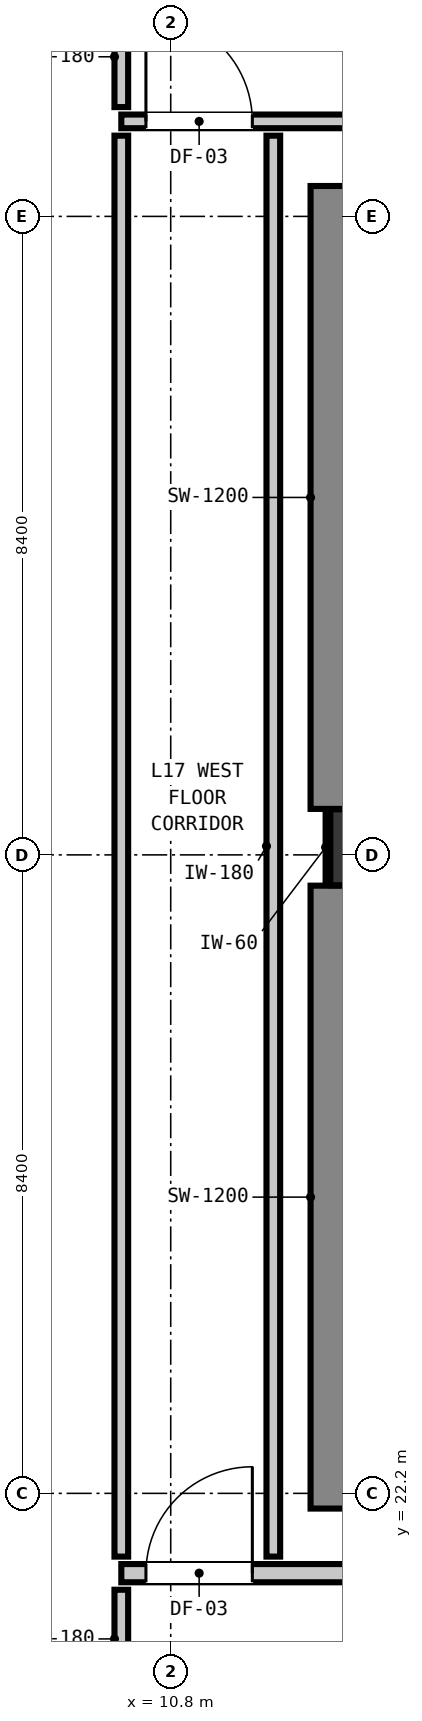
"""IFC4 building model, lengths in metres.
Left out: names, types, materials, properties, quantities, classifications, styles, units other than length and angle.
Written with IfcOpenShell. Run it as: python <this file> out.ifc"""

import sys

from ifc_helpers import new_model, si_unit, direction, frame, frame_2d, origin, origin_2d, place, context, subcontext, project, spatial, rectangle, extrude, element, fill, save


model = new_model("IFC4")
c1 = context("Model", 3, precision=1e-05, world=origin(), true_north=direction((0.0, 1.0)))
c2 = subcontext(c1, "Body", "Model", "MODEL_VIEW")
j1 = project(units=[si_unit("LENGTHUNIT", "METRE"), si_unit("PLANEANGLEUNIT", "RADIAN")], contexts=[c1])
p1 = place(None, origin())
s1 = spatial("IfcSite", under=j1, at=p1, CompositionType="ELEMENT")
p2 = place(p1, origin())
s2 = spatial("IfcBuilding", under=s1, at=p2, CompositionType="ELEMENT")
p3 = place(p2, frame((0.0, 0.0, 61.84)))
s3 = spatial("IfcBuildingStorey", under=s2, at=p3, CompositionType="ELEMENT", Elevation=61.84)
p4 = place(p3, frame((13.4, 30.7, 0.0), z_axis=(0.0, 0.0, 1.0), x_axis=(1.0, 0.0, 0.0)))
e1 = element("IfcColumn", 1, at=p4, inside=s3, PredefinedType="COLUMN", context=c2, shape_type="SweptSolid", body=[
    extrude(rectangle(XDim=1.0, YDim=1.0, at=origin_2d()), origin(), (0.0, 0.0, 1.0), 3.32),
])
p5 = place(p3, frame((13.24, 22.0, 0.0), z_axis=(0.0, 0.0, 1.0), x_axis=(0.0, 1.0, 0.0)))
e2 = element("IfcWall", 2, at=p5, inside=s3, PredefinedType="SHEAR", context=c2, shape_type="SweptSolid", body=[
    extrude(rectangle(XDim=8.195, YDim=1.2, at=frame_2d((4.098, 0.0))), origin(), (0.0, 0.0, 1.0), 3.32),
])
p6 = place(p3, frame((13.24, 31.205, 0.0), z_axis=(0.0, 0.0, 1.0), x_axis=(0.0, 1.0, 0.0)))
e3 = element("IfcWall", 3, at=p6, inside=s3, PredefinedType="SHEAR", context=c2, shape_type="SweptSolid", body=[
    extrude(rectangle(XDim=8.195, YDim=1.2, at=frame_2d((4.097, 0.0))), origin(), (0.0, 0.0, 1.0), 3.32),
])
p7 = place(p3, frame((10.15, 21.15, 0.0), z_axis=(0.0, 0.0, 1.0), x_axis=(1.0, 0.0, 0.0)))
e4 = element("IfcWall", 4, at=p7, inside=s3, PredefinedType="PARTITIONING", context=c2, shape_type="SweptSolid", body=[
    extrude(rectangle(XDim=26.779, YDim=0.24, at=frame_2d((13.39, 0.0))), origin(), (0.0, 0.0, 1.0), 3.06),
])
p8 = place(p7, frame((8.06, 0.0, 0.0)))
e5 = element("IfcOpeningElement", 5, at=p8, cuts=e4, PredefinedType="OPENING", context=c2, shape_type="SweptSolid", body=[
    extrude(rectangle(XDim=1.1, YDim=2.15, at=frame_2d((0.55, 1.075))), frame((0.0, 0.13, 0.0), z_axis=(0.0, -1.0, 0.0), x_axis=(1.0, 0.0, 0.0)), (0.0, 0.0, 1.0), 0.26),
])
p9 = place(p7, frame((0.324, 0.0, 0.0)))
e6 = element("IfcOpeningElement", 6, at=p9, cuts=e4, PredefinedType="OPENING", context=c2, shape_type="SweptSolid", body=[
    extrude(rectangle(XDim=1.4, YDim=2.15, at=frame_2d((0.7, 1.075))), frame((0.0, 0.13, 0.0), z_axis=(0.0, -1.0, 0.0), x_axis=(1.0, 0.0, 0.0)), (0.0, 0.0, 1.0), 0.26),
])
p10 = place(p3, frame((10.15, 40.25, 0.0), z_axis=(0.0, 0.0, 1.0), x_axis=(1.0, 0.0, 0.0)))
e7 = element("IfcWall", 7, at=p10, inside=s3, PredefinedType="PARTITIONING", context=c2, shape_type="SweptSolid", body=[
    extrude(rectangle(XDim=40.023, YDim=0.18, at=frame_2d((20.012, 0.0))), origin(), (0.0, 0.0, 1.0), 3.06),
])
p11 = place(p10, frame((7.285, 0.0, 0.0)))
e8 = element("IfcOpeningElement", 8, at=p11, cuts=e7, PredefinedType="OPENING", context=c2, shape_type="SweptSolid", body=[
    extrude(rectangle(XDim=1.4, YDim=2.15, at=frame_2d((0.7, 1.075))), frame((0.0, 0.1, 0.0), z_axis=(0.0, -1.0, 0.0), x_axis=(1.0, 0.0, 0.0)), (0.0, 0.0, 1.0), 0.2),
])
p12 = place(p10, frame((0.324, 0.0, 0.0)))
e9 = element("IfcOpeningElement", 9, at=p12, cuts=e7, PredefinedType="OPENING", context=c2, shape_type="SweptSolid", body=[
    extrude(rectangle(XDim=1.4, YDim=2.15, at=frame_2d((0.7, 1.075))), frame((0.0, 0.1, 0.0), z_axis=(0.0, -1.0, 0.0), x_axis=(1.0, 0.0, 0.0)), (0.0, 0.0, 1.0), 0.2),
])
p13 = place(p10, frame((31.825, 0.0, 0.0)))
e10 = element("IfcOpeningElement", 10, at=p13, cuts=e7, PredefinedType="OPENING", context=c2, shape_type="SweptSolid", body=[
    extrude(rectangle(XDim=1.0, YDim=2.15, at=frame_2d((0.5, 1.075))), frame((0.0, 0.1, 0.0), z_axis=(0.0, -1.0, 0.0), x_axis=(1.0, 0.0, 0.0)), (0.0, 0.0, 1.0), 0.2),
])
p14 = place(p3, frame((10.15, 19.638, 0.0), z_axis=(0.0, 0.0, 1.0), x_axis=(0.0, 1.0, 0.0)))
e11 = element("IfcWall", 11, at=p14, inside=s3, PredefinedType="PARTITIONING", context=c2, shape_type="SweptSolid", body=[
    extrude(rectangle(XDim=1.294, YDim=0.18, at=frame_2d((0.647, 0.0))), origin(), (0.0, 0.0, 1.0), 2.445),
])
p15 = place(p3, frame((10.15, 21.368, 0.0), z_axis=(0.0, 0.0, 1.0), x_axis=(0.0, 1.0, 0.0)))
e12 = element("IfcWall", 12, at=p15, inside=s3, PredefinedType="PARTITIONING", context=c2, shape_type="SweptSolid", body=[
    extrude(rectangle(XDim=18.694, YDim=0.18, at=frame_2d((9.347, 0.0))), origin(), (0.0, 0.0, 1.0), 3.06),
])
p16 = place(p3, frame((10.15, 40.438, 0.0), z_axis=(0.0, 0.0, 1.0), x_axis=(0.0, 1.0, 0.0)))
e13 = element("IfcWall", 13, at=p16, inside=s3, PredefinedType="PARTITIONING", context=c2, shape_type="SweptSolid", body=[
    extrude(rectangle(XDim=1.324, YDim=0.18, at=frame_2d((0.662, 0.0))), origin(), (0.0, 0.0, 1.0), 3.06),
])
p17 = place(p3, frame((12.15, 21.368, 0.0), z_axis=(0.0, 0.0, 1.0), x_axis=(0.0, 1.0, 0.0)))
e14 = element("IfcWall", 14, at=p17, inside=s3, PredefinedType="PARTITIONING", context=c2, shape_type="SweptSolid", body=[
    extrude(rectangle(XDim=18.694, YDim=0.18, at=frame_2d((9.347, 0.0))), origin(), (0.0, 0.0, 1.0), 3.06),
])
p18 = place(p3, frame((12.868, 30.21, 0.0), z_axis=(0.0, 0.0, 1.0), x_axis=(0.0, 1.0, 0.0)))
e15 = element("IfcWall", 15, at=p18, inside=s3, PredefinedType="PARTITIONING", context=c2, shape_type="SweptSolid", body=[
    extrude(rectangle(XDim=0.98, YDim=0.06, at=frame_2d((0.49, 0.0))), origin(), (0.0, 0.0, 1.0), 1.45),
])
p19 = place(p9, origin())
e16 = element("IfcDoor", 16, at=p19, inside=s3, OperationType="SINGLE_SWING_RIGHT", PredefinedType="DOOR", context=c2, shape_type="SweptSolid", body=[
    extrude(rectangle(XDim=1.4, YDim=2.15, at=frame_2d((0.7, 1.075))), frame((0.0, 0.025, 0.0), z_axis=(0.0, -1.0, 0.0), x_axis=(1.0, 0.0, 0.0)), (0.0, 0.0, 1.0), 0.05),
])
fill(e6, e16)
p20 = place(p12, origin())
e17 = element("IfcDoor", 17, at=p20, inside=s3, OperationType="SINGLE_SWING_LEFT", PredefinedType="DOOR", context=c2, shape_type="SweptSolid", body=[
    extrude(rectangle(XDim=1.4, YDim=2.15, at=frame_2d((0.7, 1.075))), frame((0.0, 0.025, 0.0), z_axis=(0.0, -1.0, 0.0), x_axis=(1.0, 0.0, 0.0)), (0.0, 0.0, 1.0), 0.05),
])
fill(e9, e17)
save(model, sys.argv[1])
